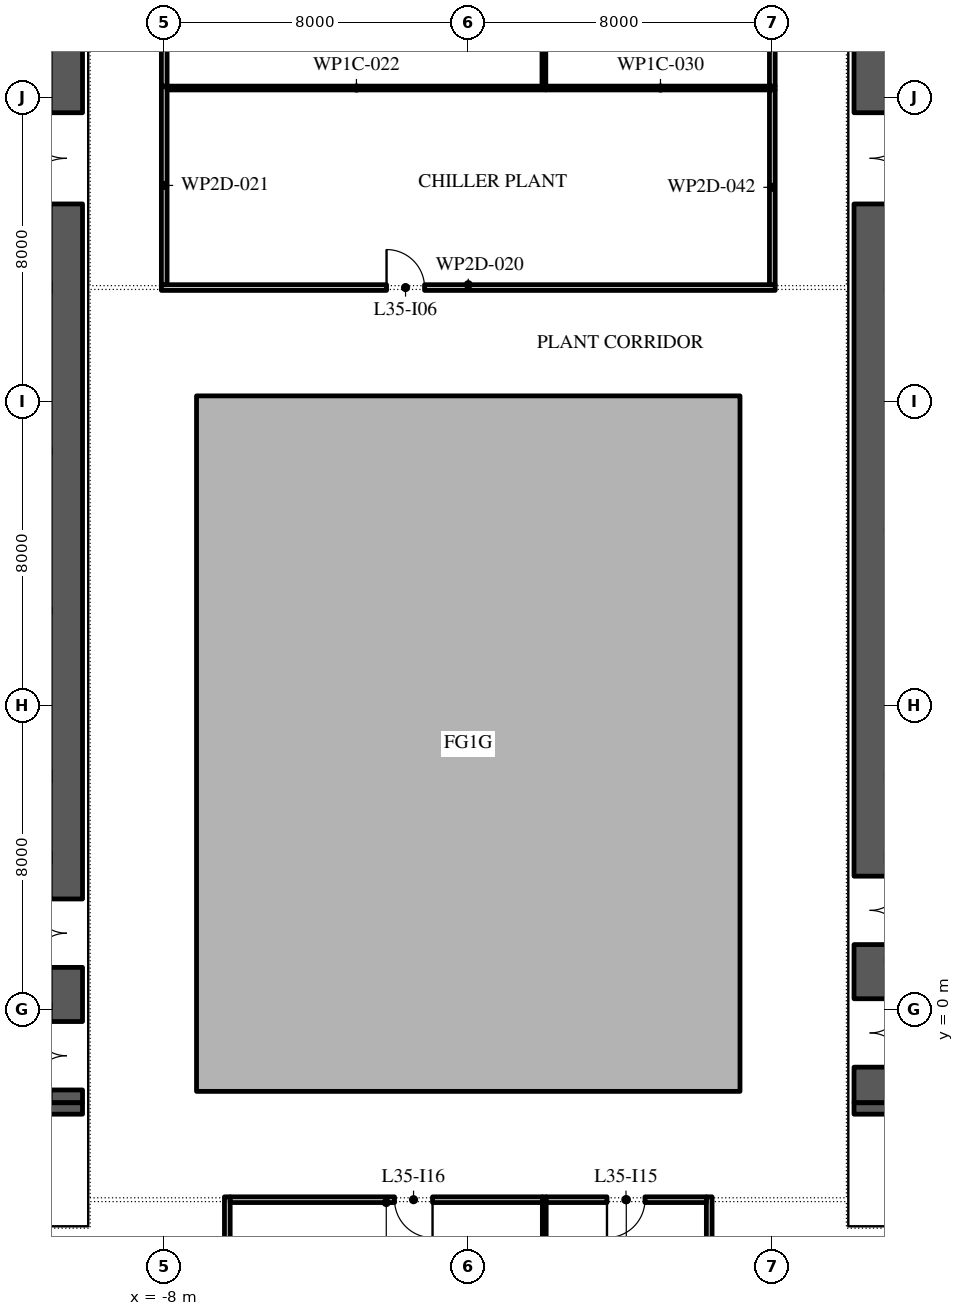
"""IFC4 building model, lengths in metres.
Left out: names, types, materials, properties, quantities, classifications, styles, units other than length and angle.
Written with IfcOpenShell. Run it as: python <this file> out.ifc"""

import sys

from ifc_helpers import new_model, si_unit, direction, frame, frame_2d, origin, place, context, subcontext, project, spatial, polyline, rectangle, outline, extrude, element, fill, save


model = new_model("IFC4")
c1 = context("Model", 3, precision=1e-05, world=origin(), true_north=direction((0.0, 1.0)))
c2 = subcontext(c1, "Body", "Model", "MODEL_VIEW")
j1 = project(units=[si_unit("LENGTHUNIT", "METRE"), si_unit("PLANEANGLEUNIT", "RADIAN")], contexts=[c1])
p1 = place(None, origin())
s1 = spatial("IfcSite", under=j1, at=p1, CompositionType="ELEMENT")
p2 = place(p1, origin())
s2 = spatial("IfcBuilding", under=s1, at=p2, CompositionType="ELEMENT")
p3 = place(p2, frame((0.0, 0.0, 160.2)))
s3 = spatial("IfcBuildingStorey", under=s2, at=p3, CompositionType="ELEMENT", Elevation=160.2)
p4 = place(p3, origin())
e1 = element("IfcWall", 1, at=p4, inside=s3, PredefinedType="STANDARD", context=c2, shape_type="SweptSolid", body=[
    extrude(outline(polyline([(-7.15, -2.15), (7.15, -2.15), (7.15, 16.15), (-7.15, 16.15), (-7.15, -2.15)]), holes=[polyline([(-7.0, -2.0), (-7.0, 16.0), (7.0, 16.0), (7.0, -2.0), (-7.0, -2.0)])]), origin(), (0.0, 0.0, 1.0), 4.95),
])
p5 = place(p3, frame((-10.575, -2.45, 0.0), z_axis=(0.0, 0.0, 1.0), x_axis=(0.0, 1.0, 0.0)))
e2 = element("IfcWall", 2, at=p5, inside=s3, PredefinedType="SHEAR", context=c2, shape_type="SweptSolid", body=[
    extrude(rectangle(XDim=27.9, YDim=0.85, at=frame_2d((13.95, 0.0))), origin(), (0.0, 0.0, 1.0), 4.95),
])
p6 = place(p5, frame((23.65, 0.0, 0.0)))
e3 = element("IfcOpeningElement", 3, at=p6, cuts=e2, PredefinedType="OPENING", context=c2, shape_type="SweptSolid", body=[
    extrude(rectangle(XDim=2.4, YDim=2.1, at=frame_2d((1.2, 1.05))), frame((0.0, 0.435, 0.0), z_axis=(0.0, -1.0, 0.0), x_axis=(1.0, 0.0, 0.0)), (0.0, 0.0, 1.0), 0.87),
])
p7 = place(p5, frame((0.337, 0.0, 0.0)))
e4 = element("IfcOpeningElement", 4, at=p7, cuts=e2, PredefinedType="OPENING", context=c2, shape_type="SweptSolid", body=[
    extrude(rectangle(XDim=1.8, YDim=2.4, at=frame_2d((0.9, 1.2))), frame((0.0, 0.435, 0.0), z_axis=(0.0, -1.0, 0.0), x_axis=(1.0, 0.0, 0.0)), (0.0, 0.0, 1.0), 0.87),
])
p8 = place(p5, frame((3.562, 0.0, 0.0)))
e5 = element("IfcOpeningElement", 5, at=p8, cuts=e2, PredefinedType="OPENING", context=c2, shape_type="SweptSolid", body=[
    extrude(rectangle(XDim=1.8, YDim=2.4, at=frame_2d((0.9, 1.2))), frame((0.0, 0.435, 0.0), z_axis=(0.0, -1.0, 0.0), x_axis=(1.0, 0.0, 0.0)), (0.0, 0.0, 1.0), 0.87),
])
p9 = place(p3, frame((-21.85, -2.6, 0.0), z_axis=(0.0, 0.0, 1.0), x_axis=(1.0, 0.0, 0.0)))
e6 = element("IfcWall", 6, at=p9, inside=s3, PredefinedType="SHEAR", context=c2, shape_type="SweptSolid", body=[
    extrude(rectangle(XDim=11.7, YDim=0.3, at=frame_2d((5.85, 0.0))), origin(), (0.0, 0.0, 1.0), 4.95),
])
p10 = place(p3, frame((10.575, -2.45, 0.0), z_axis=(0.0, 0.0, 1.0), x_axis=(0.0, 1.0, 0.0)))
e7 = element("IfcWall", 7, at=p10, inside=s3, PredefinedType="SHEAR", context=c2, shape_type="SweptSolid", body=[
    extrude(rectangle(XDim=27.9, YDim=0.85, at=frame_2d((13.95, 0.0))), origin(), (0.0, 0.0, 1.0), 4.95),
])
p11 = place(p10, frame((23.65, 0.0, 0.0)))
e8 = element("IfcOpeningElement", 8, at=p11, cuts=e7, PredefinedType="OPENING", context=c2, shape_type="SweptSolid", body=[
    extrude(rectangle(XDim=2.4, YDim=2.1, at=frame_2d((1.2, 1.05))), frame((0.0, 0.435, 0.0), z_axis=(0.0, -1.0, 0.0), x_axis=(1.0, 0.0, 0.0)), (0.0, 0.0, 1.0), 0.87),
])
p12 = place(p10, frame((0.938, 0.0, 0.0)))
e9 = element("IfcOpeningElement", 9, at=p12, cuts=e7, PredefinedType="OPENING", context=c2, shape_type="SweptSolid", body=[
    extrude(rectangle(XDim=1.8, YDim=2.4, at=frame_2d((0.9, 1.2))), frame((0.0, 0.435, 0.0), z_axis=(0.0, -1.0, 0.0), x_axis=(1.0, 0.0, 0.0)), (0.0, 0.0, 1.0), 0.87),
])
p13 = place(p10, frame((4.163, 0.0, 0.0)))
e10 = element("IfcOpeningElement", 10, at=p13, cuts=e7, PredefinedType="OPENING", context=c2, shape_type="SweptSolid", body=[
    extrude(rectangle(XDim=1.8, YDim=2.4, at=frame_2d((0.9, 1.2))), frame((0.0, 0.435, 0.0), z_axis=(0.0, -1.0, 0.0), x_axis=(1.0, 0.0, 0.0)), (0.0, 0.0, 1.0), 0.87),
])
p14 = place(p3, frame((10.15, -2.6, 0.0), z_axis=(0.0, 0.0, 1.0), x_axis=(1.0, 0.0, 0.0)))
e11 = element("IfcWall", 11, at=p14, inside=s3, PredefinedType="SHEAR", context=c2, shape_type="SweptSolid", body=[
    extrude(rectangle(XDim=11.7, YDim=0.3, at=frame_2d((5.85, 0.0))), origin(), (0.0, 0.0, 1.0), 4.95),
])
p15 = place(p3, frame((-8.075, 19.0, 0.0), z_axis=(0.0, 0.0, 1.0), x_axis=(1.0, 0.0, 0.0)))
e12 = element("IfcWall", 12, at=p15, inside=s3, PredefinedType="PARTITIONING", context=c2, shape_type="SweptSolid", body=[
    extrude(rectangle(XDim=16.15, YDim=0.15, at=frame_2d((8.075, 0.0))), origin(), (0.0, 0.0, 1.0), 4.95),
])
p16 = place(p15, frame((5.925, 0.0, 0.0)))
e13 = element("IfcOpeningElement", 13, at=p16, cuts=e12, PredefinedType="OPENING", context=c2, shape_type="SweptSolid", body=[
    extrude(rectangle(XDim=1.0, YDim=2.1, at=frame_2d((0.5, 1.05))), frame((0.0, 0.085, 0.0), z_axis=(0.0, -1.0, 0.0), x_axis=(1.0, 0.0, 0.0)), (0.0, 0.0, 1.0), 0.17),
])
p17 = place(p3, frame((-8.0, 24.3, 0.0), z_axis=(0.0, 0.0, 1.0), x_axis=(0.0, -1.0, 0.0)))
e14 = element("IfcWall", 14, at=p17, inside=s3, PredefinedType="PARTITIONING", context=c2, shape_type="SweptSolid", body=[
    extrude(rectangle(XDim=5.225, YDim=0.15, at=frame_2d((2.613, 0.0))), origin(), (0.0, 0.0, 1.0), 4.95),
])
p18 = place(p3, frame((-7.925, 24.25, 0.0), z_axis=(0.0, 0.0, 1.0), x_axis=(1.0, 0.0, 0.0)))
e15 = element("IfcWall", 15, at=p18, inside=s3, PredefinedType="PARTITIONING", context=c2, shape_type="SweptSolid", body=[
    extrude(rectangle(XDim=9.965, YDim=0.1, at=frame_2d((4.982, 0.0))), origin(), (0.0, 0.0, 1.0), 4.95),
])
p19 = place(p3, frame((-8.0, 27.325, 0.0), z_axis=(0.0, 0.0, 1.0), x_axis=(0.0, -1.0, 0.0)))
e16 = element("IfcWall", 16, at=p19, inside=s3, PredefinedType="PARTITIONING", context=c2, shape_type="SweptSolid", body=[
    extrude(rectangle(XDim=3.025, YDim=0.15, at=frame_2d((1.512, 0.0))), origin(), (0.0, 0.0, 1.0), 4.95),
])
p20 = place(p3, frame((-6.34, -4.925, 0.0), z_axis=(0.0, 0.0, 1.0), x_axis=(0.0, -1.0, 0.0)))
e17 = element("IfcWall", 17, at=p20, inside=s3, PredefinedType="PARTITIONING", context=c2, shape_type="SweptSolid", body=[
    extrude(rectangle(XDim=2.765, YDim=0.15, at=frame_2d((1.382, 0.0))), origin(), (0.0, 0.0, 1.0), 4.95),
])
p21 = place(p3, frame((1.99, 24.3, 0.0), z_axis=(0.0, 0.0, 1.0), x_axis=(0.0, 1.0, 0.0)))
e18 = element("IfcWall", 18, at=p21, inside=s3, PredefinedType="PARTITIONING", context=c2, shape_type="SweptSolid", body=[
    extrude(rectangle(XDim=6.15, YDim=0.1, at=frame_2d((3.075, 0.0))), origin(), (0.0, 0.0, 1.0), 4.95),
])
p22 = place(p3, frame((2.04, 24.25, 0.0), z_axis=(0.0, 0.0, 1.0), x_axis=(1.0, 0.0, 0.0)))
e19 = element("IfcWall", 19, at=p22, inside=s3, PredefinedType="PARTITIONING", context=c2, shape_type="SweptSolid", body=[
    extrude(rectangle(XDim=6.035, YDim=0.1, at=frame_2d((3.018, 0.0))), origin(), (0.0, 0.0, 1.0), 4.95),
])
p23 = place(p3, frame((2.0, -11.95, 0.0), z_axis=(0.0, 0.0, 1.0), x_axis=(0.0, 1.0, 0.0)))
e20 = element("IfcWall", 20, at=p23, inside=s3, PredefinedType="PARTITIONING", context=c2, shape_type="SweptSolid", body=[
    extrude(rectangle(XDim=7.025, YDim=0.1, at=frame_2d((3.512, 0.0))), origin(), (0.0, 0.0, 1.0), 4.95),
])
p24 = place(p3, frame((1.95, -5.0, 0.0), z_axis=(0.0, 0.0, 1.0), x_axis=(-1.0, 0.0, 0.0)))
e21 = element("IfcWall", 21, at=p24, inside=s3, PredefinedType="PARTITIONING", context=c2, shape_type="SweptSolid", body=[
    extrude(rectangle(XDim=8.215, YDim=0.15, at=frame_2d((4.107, 0.0))), origin(), (0.0, 0.0, 1.0), 4.95),
])
p25 = place(p24, frame((2.89, 0.0, 0.0)))
e22 = element("IfcOpeningElement", 22, at=p25, cuts=e21, PredefinedType="OPENING", context=c2, shape_type="SweptSolid", body=[
    extrude(rectangle(XDim=1.0, YDim=2.1, at=frame_2d((0.5, 1.05))), frame((0.0, 0.085, 0.0), z_axis=(0.0, -1.0, 0.0), x_axis=(1.0, 0.0, 0.0)), (0.0, 0.0, 1.0), 0.17),
])
p26 = place(p3, frame((6.34, -7.765, 0.0), z_axis=(0.0, 0.0, 1.0), x_axis=(0.0, 1.0, 0.0)))
e23 = element("IfcWall", 23, at=p26, inside=s3, PredefinedType="PARTITIONING", context=c2, shape_type="SweptSolid", body=[
    extrude(rectangle(XDim=2.84, YDim=0.15, at=frame_2d((1.42, 0.0))), origin(), (0.0, 0.0, 1.0), 4.95),
])
p27 = place(p3, frame((6.265, -5.0, 0.0), z_axis=(0.0, 0.0, 1.0), x_axis=(-1.0, 0.0, 0.0)))
e24 = element("IfcWall", 24, at=p27, inside=s3, PredefinedType="PARTITIONING", context=c2, shape_type="SweptSolid", body=[
    extrude(rectangle(XDim=4.215, YDim=0.15, at=frame_2d((2.107, 0.0))), origin(), (0.0, 0.0, 1.0), 4.95),
])
p28 = place(p27, frame((1.615, 0.0, 0.0)))
e25 = element("IfcOpeningElement", 25, at=p28, cuts=e24, PredefinedType="OPENING", context=c2, shape_type="SweptSolid", body=[
    extrude(rectangle(XDim=1.0, YDim=2.1, at=frame_2d((0.5, 1.05))), frame((0.0, 0.085, 0.0), z_axis=(0.0, -1.0, 0.0), x_axis=(1.0, 0.0, 0.0)), (0.0, 0.0, 1.0), 0.17),
])
p29 = place(p3, frame((8.0, 19.075, 0.0), z_axis=(0.0, 0.0, 1.0), x_axis=(0.0, 1.0, 0.0)))
e26 = element("IfcWall", 26, at=p29, inside=s3, PredefinedType="PARTITIONING", context=c2, shape_type="SweptSolid", body=[
    extrude(rectangle(XDim=5.125, YDim=0.15, at=frame_2d((2.562, 0.0))), origin(), (0.0, 0.0, 1.0), 4.95),
])
p30 = place(p3, frame((8.0, 24.3, 0.0), z_axis=(0.0, 0.0, 1.0), x_axis=(0.0, 1.0, 0.0)))
e27 = element("IfcWall", 27, at=p30, inside=s3, PredefinedType="PARTITIONING", context=c2, shape_type="SweptSolid", body=[
    extrude(rectangle(XDim=3.175, YDim=0.15, at=frame_2d((1.587, 0.0))), origin(), (0.0, 0.0, 1.0), 4.95),
])
p31 = place(p6, origin())
e28 = element("IfcDoor", 28, at=p31, inside=s3, OperationType="DOUBLE_DOOR_SINGLE_SWING", PredefinedType="DOOR", context=c2, shape_type="SweptSolid", body=[
    extrude(rectangle(XDim=2.4, YDim=2.1, at=frame_2d((1.2, 1.05))), frame((0.0, 0.025, 0.0), z_axis=(0.0, -1.0, 0.0), x_axis=(1.0, 0.0, 0.0)), (0.0, 0.0, 1.0), 0.05),
])
fill(e3, e28)
p32 = place(p7, origin())
e29 = element("IfcDoor", 29, at=p32, inside=s3, OperationType="DOUBLE_DOOR_SINGLE_SWING", PredefinedType="DOOR", context=c2, shape_type="SweptSolid", body=[
    extrude(rectangle(XDim=1.8, YDim=2.4, at=frame_2d((0.9, 1.2))), frame((0.0, 0.425, 0.0), z_axis=(0.0, -1.0, 0.0), x_axis=(1.0, 0.0, 0.0)), (0.0, 0.0, 1.0), 0.05),
])
fill(e4, e29)
p33 = place(p8, origin())
e30 = element("IfcDoor", 30, at=p33, inside=s3, OperationType="DOUBLE_DOOR_SINGLE_SWING", PredefinedType="DOOR", context=c2, shape_type="SweptSolid", body=[
    extrude(rectangle(XDim=1.8, YDim=2.4, at=frame_2d((0.9, 1.2))), frame((0.0, 0.425, 0.0), z_axis=(0.0, -1.0, 0.0), x_axis=(1.0, 0.0, 0.0)), (0.0, 0.0, 1.0), 0.05),
])
fill(e5, e30)
p34 = place(p11, frame((2.4, 0.0, 0.0), z_axis=(0.0, 0.0, 1.0), x_axis=(-1.0, 0.0, 0.0)))
e31 = element("IfcDoor", 31, at=p34, inside=s3, OperationType="DOUBLE_DOOR_SINGLE_SWING", PredefinedType="DOOR", context=c2, shape_type="SweptSolid", body=[
    extrude(rectangle(XDim=2.4, YDim=2.1, at=frame_2d((1.2, 1.05))), frame((0.0, 0.025, 0.0), z_axis=(0.0, -1.0, 0.0), x_axis=(1.0, 0.0, 0.0)), (0.0, 0.0, 1.0), 0.05),
])
fill(e8, e31)
p35 = place(p12, frame((1.8, -0.8, 0.0), z_axis=(0.0, 0.0, 1.0), x_axis=(-1.0, 0.0, 0.0)))
e32 = element("IfcDoor", 32, at=p35, inside=s3, OperationType="DOUBLE_DOOR_SINGLE_SWING", PredefinedType="DOOR", context=c2, shape_type="SweptSolid", body=[
    extrude(rectangle(XDim=1.8, YDim=2.4, at=frame_2d((0.9, 1.2))), frame((0.0, -0.375, 0.0), z_axis=(0.0, -1.0, 0.0), x_axis=(1.0, 0.0, 0.0)), (0.0, 0.0, 1.0), 0.05),
])
fill(e9, e32)
p36 = place(p13, frame((1.8, -0.8, 0.0), z_axis=(0.0, 0.0, 1.0), x_axis=(-1.0, 0.0, 0.0)))
e33 = element("IfcDoor", 33, at=p36, inside=s3, OperationType="DOUBLE_DOOR_SINGLE_SWING", PredefinedType="DOOR", context=c2, shape_type="SweptSolid", body=[
    extrude(rectangle(XDim=1.8, YDim=2.4, at=frame_2d((0.9, 1.2))), frame((0.0, -0.375, 0.0), z_axis=(0.0, -1.0, 0.0), x_axis=(1.0, 0.0, 0.0)), (0.0, 0.0, 1.0), 0.05),
])
fill(e10, e33)
p37 = place(p16, origin())
e34 = element("IfcDoor", 34, at=p37, inside=s3, OperationType="SINGLE_SWING_RIGHT", PredefinedType="DOOR", context=c2, shape_type="SweptSolid", body=[
    extrude(rectangle(XDim=1.0, YDim=2.1, at=frame_2d((0.5, 1.05))), frame((0.0, 0.025, 0.0), z_axis=(0.0, -1.0, 0.0), x_axis=(1.0, 0.0, 0.0)), (0.0, 0.0, 1.0), 0.05),
])
fill(e13, e34)
p38 = place(p28, origin())
e35 = element("IfcDoor", 35, at=p38, inside=s3, OperationType="SINGLE_SWING_LEFT", PredefinedType="DOOR", context=c2, shape_type="SweptSolid", body=[
    extrude(rectangle(XDim=1.0, YDim=2.1, at=frame_2d((0.5, 1.05))), frame((0.0, 0.025, 0.0), z_axis=(0.0, -1.0, 0.0), x_axis=(1.0, 0.0, 0.0)), (0.0, 0.0, 1.0), 0.05),
])
fill(e25, e35)
p39 = place(p25, origin())
e36 = element("IfcDoor", 36, at=p39, inside=s3, OperationType="SINGLE_SWING_RIGHT", PredefinedType="DOOR", context=c2, shape_type="SweptSolid", body=[
    extrude(rectangle(XDim=1.0, YDim=2.1, at=frame_2d((0.5, 1.05))), frame((0.0, 0.025, 0.0), z_axis=(0.0, -1.0, 0.0), x_axis=(1.0, 0.0, 0.0)), (0.0, 0.0, 1.0), 0.05),
])
fill(e22, e36)
save(model, sys.argv[1])
